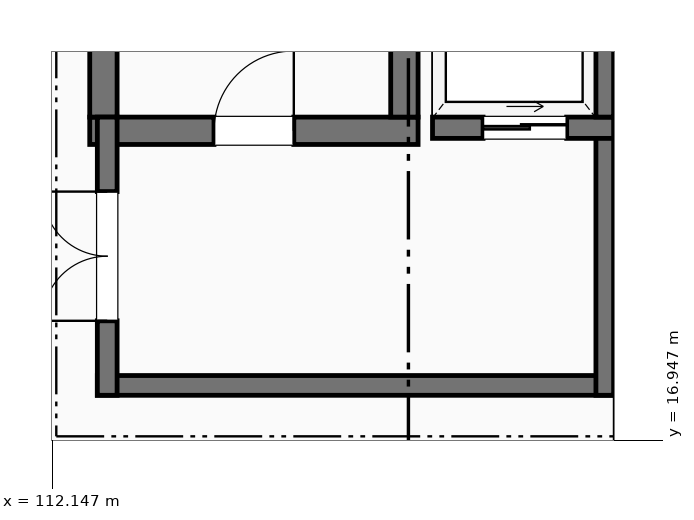
"""IFC4 building model, lengths in metres.
Left out: names, types, materials, properties, quantities, classifications, styles, units other than length and angle.
Written with IfcOpenShell. Run it as: python <this file> out.ifc"""

import sys

from ifc_helpers import new_model, si_unit, direction, frame, frame_2d, origin, place, context, subcontext, project, spatial, rectangle, extrude, element, fill, save


model = new_model("IFC4")
c1 = context("Model", 3, precision=1e-05, world=origin(), true_north=direction((0.0, 1.0)))
c2 = subcontext(c1, "Body", "Model", "MODEL_VIEW")
j1 = project(units=[si_unit("LENGTHUNIT", "METRE"), si_unit("PLANEANGLEUNIT", "RADIAN")], contexts=[c1])
p1 = place(None, origin())
s1 = spatial("IfcSite", under=j1, at=p1, CompositionType="ELEMENT")
p2 = place(p1, origin())
s2 = spatial("IfcBuilding", under=s1, at=p2, CompositionType="ELEMENT")
p3 = place(p2, frame((0.0, 0.0, 5.4)))
s3 = spatial("IfcBuildingStorey", under=s2, at=p3, CompositionType="ELEMENT", Elevation=5.4)
p4 = place(p3, frame((112.64, 21.02, 0.0), z_axis=(0.0, 0.0, 1.0), x_axis=(1.0, 0.0, 0.0)))
e1 = element("IfcWall", 1, at=p4, inside=s3, PredefinedType="SHEAR", context=c2, shape_type="SweptSolid", body=[
    extrude(rectangle(XDim=4.32, YDim=0.36, at=frame_2d((2.16, 0.0))), origin(), (0.0, 0.0, 1.0), 5.4),
])
p5 = place(p4, frame((1.635, 0.0, 0.0)))
e2 = element("IfcOpeningElement", 2, at=p5, cuts=e1, PredefinedType="OPENING", context=c2, shape_type="SweptSolid", body=[
    extrude(rectangle(XDim=1.05, YDim=2.15, at=frame_2d((0.525, 1.075))), frame((0.0, 0.19, 0.0), z_axis=(0.0, -1.0, 0.0), x_axis=(1.0, 0.0, 0.0)), (0.0, 0.0, 1.0), 0.38),
])
for number, where, z_axis, x_axis in (
    (3, (112.82, 21.2, 0.0), (0.0, 0.0, 1.0), (0.0, 1.0, 0.0)),
    (4, (116.78, 21.2, 0.0), (0.0, 0.0, 1.0), (0.0, 1.0, 0.0)),
):
    element("IfcWall", number, at=place(p3, frame(where, z_axis=z_axis, x_axis=x_axis)), inside=s3, PredefinedType="SHEAR", context=c2, shape_type="SweptSolid", body=[
        extrude(rectangle(XDim=8.6, YDim=0.36, at=frame_2d((4.3, 0.0))), origin(), (0.0, 0.0, 1.0), 5.4),
    ])
p6 = place(p3, frame((119.56, 17.67, 0.0), z_axis=(0.0, 0.0, 1.0), x_axis=(-1.0, 0.0, 0.0)))
e5 = element("IfcWall", 5, at=p6, inside=s3, PredefinedType="SHEAR", context=c2, shape_type="SweptSolid", body=[
    extrude(rectangle(XDim=6.82, YDim=0.26, at=frame_2d((3.41, 0.0))), origin(), (0.0, 0.0, 1.0), 5.4),
])
p7 = place(p3, frame((112.87, 17.54, 0.0), z_axis=(0.0, 0.0, 1.0), x_axis=(0.0, 1.0, 0.0)))
e6 = element("IfcWall", 6, at=p7, inside=s3, PredefinedType="SHEAR", context=c2, shape_type="SweptSolid", body=[
    extrude(rectangle(XDim=3.66, YDim=0.26, at=frame_2d((1.83, 0.0))), origin(), (0.0, 0.0, 1.0), 5.4),
])
p8 = place(p7, frame((0.98, 0.0, 0.0)))
e7 = element("IfcOpeningElement", 7, at=p8, cuts=e6, PredefinedType="OPENING", context=c2, shape_type="SweptSolid", body=[
    extrude(rectangle(XDim=1.7, YDim=2.2, at=frame_2d((0.85, 1.1))), frame((0.0, 0.14, 0.0), z_axis=(0.0, -1.0, 0.0), x_axis=(1.0, 0.0, 0.0)), (0.0, 0.0, 1.0), 0.28),
])
p9 = place(p3, frame((119.43, 17.54, 0.0), z_axis=(0.0, 0.0, 1.0), x_axis=(0.0, 1.0, 0.0)))
e8 = element("IfcWall", 8, at=p9, inside=s3, PredefinedType="SHEAR", context=c2, shape_type="SweptSolid", body=[
    extrude(rectangle(XDim=3.66, YDim=0.26, at=frame_2d((1.83, 0.0))), origin(), (0.0, 0.0, 1.0), 5.4),
])
p10 = place(p3, frame((117.15, 21.06, 0.0), z_axis=(0.0, 0.0, 1.0), x_axis=(1.0, 0.0, 0.0)))
e9 = element("IfcWall", 9, at=p10, inside=s3, PredefinedType="SHEAR", context=c2, shape_type="SweptSolid", body=[
    extrude(rectangle(XDim=2.43, YDim=0.28, at=frame_2d((1.215, 0.0))), origin(), (0.0, 0.0, 1.0), 5.4),
])
p11 = place(p10, frame((0.665, 0.0, 0.0)))
e10 = element("IfcOpeningElement", 10, at=p11, cuts=e9, PredefinedType="OPENING", context=c2, shape_type="SweptSolid", body=[
    extrude(rectangle(XDim=1.1, YDim=2.15, at=frame_2d((0.55, 1.075))), frame((0.0, 0.15, 0.0), z_axis=(0.0, -1.0, 0.0), x_axis=(1.0, 0.0, 0.0)), (0.0, 0.0, 1.0), 0.3),
])
p12 = place(p3, frame((119.44, 21.2, 0.0), z_axis=(0.0, 0.0, 1.0), x_axis=(0.0, 1.0, 0.0)))
e11 = element("IfcWall", 11, at=p12, inside=s3, PredefinedType="SHEAR", context=c2, shape_type="SweptSolid", body=[
    extrude(rectangle(XDim=2.8, YDim=0.28, at=frame_2d((1.4, 0.0))), origin(), (0.0, 0.0, 1.0), 5.4),
])
p13 = place(p5, origin())
e12 = element("IfcDoor", 12, at=p13, inside=s3, OperationType="SINGLE_SWING_RIGHT", PredefinedType="DOOR", context=c2, shape_type="SweptSolid", body=[
    extrude(rectangle(XDim=1.05, YDim=2.15, at=frame_2d((0.525, 1.075))), frame((0.0, 0.025, 0.0), z_axis=(0.0, -1.0, 0.0), x_axis=(1.0, 0.0, 0.0)), (0.0, 0.0, 1.0), 0.05),
])
fill(e2, e12)
p14 = place(p8, origin())
e13 = element("IfcDoor", 13, at=p14, inside=s3, OperationType="DOUBLE_DOOR_SINGLE_SWING", PredefinedType="DOOR", context=c2, shape_type="SweptSolid", body=[
    extrude(rectangle(XDim=1.7, YDim=2.2, at=frame_2d((0.85, 1.1))), frame((0.0, 0.025, 0.0), z_axis=(0.0, -1.0, 0.0), x_axis=(1.0, 0.0, 0.0)), (0.0, 0.0, 1.0), 0.05),
])
fill(e7, e13)
p15 = place(p11, origin())
e14 = element("IfcDoor", 14, at=p15, inside=s3, OperationType="SLIDING_TO_LEFT", PredefinedType="DOOR", context=c2, shape_type="SweptSolid", body=[
    extrude(rectangle(XDim=1.1, YDim=2.15, at=frame_2d((0.55, 1.075))), frame((0.0, 0.025, 0.0), z_axis=(0.0, -1.0, 0.0), x_axis=(1.0, 0.0, 0.0)), (0.0, 0.0, 1.0), 0.05),
])
fill(e10, e14)
save(model, sys.argv[1])
